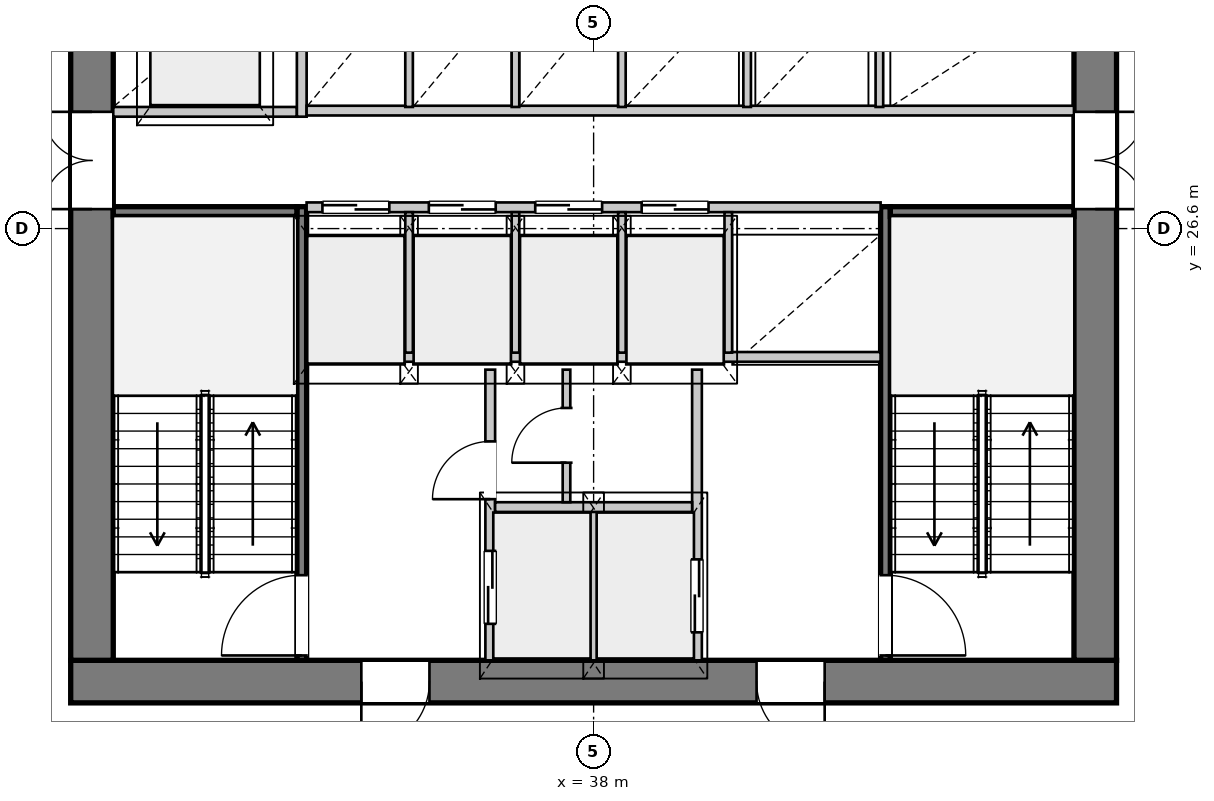
"""IFC4 building model, lengths in metres.
Left out: names, types, materials, properties, quantities, classifications, styles, units other than length and angle.
Written with IfcOpenShell. Run it as: python <this file> out.ifc"""

import sys

from ifc_helpers import new_model, si_unit, direction, frame, frame_2d, origin, place, context, subcontext, project, spatial, rectangle, extrude, source, transform, mapped, element, fill, save


model = new_model("IFC4")
c1 = context("Model", 3, precision=1e-05, world=origin(), true_north=direction((0.0, 1.0)))
c2 = subcontext(c1, "Body", "Model", "MODEL_VIEW")
j1 = project(units=[si_unit("LENGTHUNIT", "METRE"), si_unit("PLANEANGLEUNIT", "RADIAN")], contexts=[c1])
p1 = place(None, origin())
s1 = spatial("IfcSite", under=j1, at=p1, CompositionType="ELEMENT")
p2 = place(p1, origin())
s2 = spatial("IfcBuilding", under=s1, at=p2, CompositionType="ELEMENT")
p3 = place(p2, frame((0.0, 0.0, 105.7)))
s3 = spatial("IfcBuildingStorey", under=s2, at=p3, CompositionType="ELEMENT", Elevation=105.7)
p4 = place(p3, frame((46.6, 19.15, 0.0), z_axis=(0.0, 0.0, 1.0), x_axis=(-1.0, 0.0, 0.0)))
e1 = element("IfcWall", 1, at=p4, inside=s3, PredefinedType="SHEAR", context=c2, shape_type="SweptSolid", body=[
    extrude(rectangle(XDim=17.2, YDim=0.7, at=frame_2d((8.6, 0.0))), origin(), (0.0, 0.0, 1.0), 3.3),
])
p5 = place(p4, frame((4.8, 0.0, 0.0)))
e2 = element("IfcOpeningElement", 2, at=p5, cuts=e1, PredefinedType="OPENING", context=c2, shape_type="SweptSolid", body=[
    extrude(rectangle(XDim=1.12, YDim=2.25, at=frame_2d((0.56, 1.125))), frame((0.0, 0.36, 0.0), z_axis=(0.0, -1.0, 0.0), x_axis=(1.0, 0.0, 0.0)), (0.0, 0.0, 1.0), 0.72),
])
p6 = place(p4, frame((11.3, 0.0, 0.0)))
e3 = element("IfcOpeningElement", 3, at=p6, cuts=e1, PredefinedType="OPENING", context=c2, shape_type="SweptSolid", body=[
    extrude(rectangle(XDim=1.12, YDim=2.25, at=frame_2d((0.56, 1.125))), frame((0.0, 0.36, 0.0), z_axis=(0.0, -1.0, 0.0), x_axis=(1.0, 0.0, 0.0)), (0.0, 0.0, 1.0), 0.72),
])
p7 = place(p3, frame((29.75, 19.5, 0.0), z_axis=(0.0, 0.0, 1.0), x_axis=(0.0, 1.0, 0.0)))
e4 = element("IfcWall", 4, at=p7, inside=s3, PredefinedType="SHEAR", context=c2, shape_type="SweptSolid", body=[
    extrude(rectangle(XDim=14.2, YDim=0.7, at=frame_2d((7.1, 0.0))), origin(), (0.0, 0.0, 1.0), 3.3),
])
p8 = place(p7, frame((7.42, 0.0, 0.0)))
e5 = element("IfcOpeningElement", 5, at=p8, cuts=e4, PredefinedType="OPENING", context=c2, shape_type="SweptSolid", body=[
    extrude(rectangle(XDim=1.6, YDim=2.2, at=frame_2d((0.8, 1.1))), frame((0.0, 0.36, 0.0), z_axis=(0.0, -1.0, 0.0), x_axis=(1.0, 0.0, 0.0)), (0.0, 0.0, 1.0), 0.72),
])
p9 = place(p3, frame((46.25, 33.7, 0.0), z_axis=(0.0, 0.0, 1.0), x_axis=(0.0, -1.0, 0.0)))
e6 = element("IfcWall", 6, at=p9, inside=s3, PredefinedType="SHEAR", context=c2, shape_type="SweptSolid", body=[
    extrude(rectangle(XDim=14.2, YDim=0.7, at=frame_2d((7.1, 0.0))), origin(), (0.0, 0.0, 1.0), 3.3),
])
p10 = place(p9, frame((5.18, 0.0, 0.0)))
e7 = element("IfcOpeningElement", 7, at=p10, cuts=e6, PredefinedType="OPENING", context=c2, shape_type="SweptSolid", body=[
    extrude(rectangle(XDim=1.6, YDim=2.2, at=frame_2d((0.8, 1.1))), frame((0.0, 0.36, 0.0), z_axis=(0.0, -1.0, 0.0), x_axis=(1.0, 0.0, 0.0)), (0.0, 0.0, 1.0), 0.72),
])
p11 = place(p3, frame((33.2, 19.5, 0.0), z_axis=(0.0, 0.0, 1.0), x_axis=(0.0, 1.0, 0.0)))
e8 = element("IfcWall", 8, at=p11, inside=s3, PredefinedType="PARTITIONING", context=c2, shape_type="SweptSolid", body=[
    extrude(rectangle(XDim=7.46, YDim=0.16, at=frame_2d((3.73, 0.0))), origin(), (0.0, 0.0, 1.0), 3.3),
])
p12 = place(p11, frame((0.08, 0.0, 0.0)))
e9 = element("IfcOpeningElement", 9, at=p12, cuts=e8, PredefinedType="OPENING", context=c2, shape_type="SweptSolid", body=[
    extrude(rectangle(XDim=1.32, YDim=2.2, at=frame_2d((0.66, 1.1))), frame((0.0, 0.09, 0.0), z_axis=(0.0, -1.0, 0.0), x_axis=(1.0, 0.0, 0.0)), (0.0, 0.0, 1.0), 0.18),
])
p13 = place(p3, frame((30.1, 26.88, 0.0), z_axis=(0.0, 0.0, 1.0), x_axis=(1.0, 0.0, 0.0)))
e10 = element("IfcWall", 10, at=p13, inside=s3, PredefinedType="PARTITIONING", context=c2, shape_type="SweptSolid", body=[
    extrude(rectangle(XDim=3.02, YDim=0.16, at=frame_2d((1.51, 0.0))), origin(), (0.0, 0.0, 1.0), 3.3),
])
p14 = place(p3, frame((42.8, 26.96, 0.0), z_axis=(0.0, 0.0, 1.0), x_axis=(0.0, -1.0, 0.0)))
e11 = element("IfcWall", 11, at=p14, inside=s3, PredefinedType="PARTITIONING", context=c2, shape_type="SweptSolid", body=[
    extrude(rectangle(XDim=7.46, YDim=0.16, at=frame_2d((3.73, 0.0))), origin(), (0.0, 0.0, 1.0), 3.3),
])
p15 = place(p14, frame((6.06, 0.0, 0.0)))
e12 = element("IfcOpeningElement", 12, at=p15, cuts=e11, PredefinedType="OPENING", context=c2, shape_type="SweptSolid", body=[
    extrude(rectangle(XDim=1.32, YDim=2.2, at=frame_2d((0.66, 1.1))), frame((0.0, 0.09, 0.0), z_axis=(0.0, -1.0, 0.0), x_axis=(1.0, 0.0, 0.0)), (0.0, 0.0, 1.0), 0.18),
])
p16 = place(p3, frame((42.88, 26.88, 0.0), z_axis=(0.0, 0.0, 1.0), x_axis=(1.0, 0.0, 0.0)))
e13 = element("IfcWall", 13, at=p16, inside=s3, PredefinedType="PARTITIONING", context=c2, shape_type="SweptSolid", body=[
    extrude(rectangle(XDim=3.02, YDim=0.16, at=frame_2d((1.51, 0.0))), origin(), (0.0, 0.0, 1.0), 3.3),
])
p17 = place(p3, frame((36.3, 19.5, 0.0), z_axis=(0.0, 0.0, 1.0), x_axis=(0.0, 1.0, 0.0)))
e14 = element("IfcWall", 14, at=p17, inside=s3, PredefinedType="PARTITIONING", context=c2, shape_type="SweptSolid", body=[
    extrude(rectangle(XDim=4.78, YDim=0.16, at=frame_2d((2.39, 0.0))), origin(), (0.0, 0.0, 1.0), 3.3),
])
p18 = place(p17, frame((0.6, 0.0, 0.0)))
e15 = element("IfcOpeningElement", 15, at=p18, cuts=e14, PredefinedType="OPENING", context=c2, shape_type="SweptSolid", body=[
    extrude(rectangle(XDim=1.2, YDim=2.2, at=frame_2d((0.6, 1.1))), frame((0.0, 0.09, 0.0), z_axis=(0.0, -1.0, 0.0), x_axis=(1.0, 0.0, 0.0)), (0.0, 0.0, 1.0), 0.18),
])
p19 = place(p17, frame((2.65, 0.0, 0.0)))
e16 = element("IfcOpeningElement", 16, at=p19, cuts=e14, PredefinedType="OPENING", context=c2, shape_type="SweptSolid", body=[
    extrude(rectangle(XDim=0.95, YDim=2.1, at=frame_2d((0.475, 1.05))), frame((0.0, 0.09, 0.0), z_axis=(0.0, -1.0, 0.0), x_axis=(1.0, 0.0, 0.0)), (0.0, 0.0, 1.0), 0.18),
])
p20 = place(p3, frame((39.7, 24.28, 0.0), z_axis=(0.0, 0.0, 1.0), x_axis=(0.0, -1.0, 0.0)))
e17 = element("IfcWall", 17, at=p20, inside=s3, PredefinedType="PARTITIONING", context=c2, shape_type="SweptSolid", body=[
    extrude(rectangle(XDim=4.78, YDim=0.16, at=frame_2d((2.39, 0.0))), origin(), (0.0, 0.0, 1.0), 3.3),
])
p21 = place(p20, frame((3.12, 0.0, 0.0)))
e18 = element("IfcOpeningElement", 18, at=p21, cuts=e17, PredefinedType="OPENING", context=c2, shape_type="SweptSolid", body=[
    extrude(rectangle(XDim=1.2, YDim=2.2, at=frame_2d((0.6, 1.1))), frame((0.0, 0.09, 0.0), z_axis=(0.0, -1.0, 0.0), x_axis=(1.0, 0.0, 0.0)), (0.0, 0.0, 1.0), 0.18),
])
p22 = place(p3, frame((38.0, 19.5, 0.0), z_axis=(0.0, 0.0, 1.0), x_axis=(0.0, 1.0, 0.0)))
e19 = element("IfcWall", 19, at=p22, inside=s3, PredefinedType="PARTITIONING", context=c2, shape_type="SweptSolid", body=[
    extrude(rectangle(XDim=2.46, YDim=0.125, at=frame_2d((1.23, 0.0))), origin(), (0.0, 0.0, 1.0), 3.3),
])
p23 = place(p3, frame((36.38, 22.02, 0.0), z_axis=(0.0, 0.0, 1.0), x_axis=(1.0, 0.0, 0.0)))
e20 = element("IfcWall", 20, at=p23, inside=s3, PredefinedType="PARTITIONING", context=c2, shape_type="SweptSolid", body=[
    extrude(rectangle(XDim=3.24, YDim=0.16, at=frame_2d((1.62, 0.0))), origin(), (0.0, 0.0, 1.0), 3.3),
])
p24 = place(p3, frame((33.28, 24.49, 0.0), z_axis=(0.0, 0.0, 1.0), x_axis=(1.0, 0.0, 0.0)))
e21 = element("IfcWall", 21, at=p24, inside=s3, PredefinedType="PARTITIONING", context=c2, shape_type="SweptSolid", body=[
    extrude(rectangle(XDim=9.44, YDim=0.16, at=frame_2d((4.72, 0.0))), origin(), (0.0, 0.0, 1.0), 3.3),
])
p25 = place(p3, frame((37.554, 22.1, 0.0), z_axis=(0.0, 0.0, 1.0), x_axis=(0.0, 1.0, 0.0)))
e22 = element("IfcWall", 22, at=p25, inside=s3, PredefinedType="PARTITIONING", context=c2, shape_type="SweptSolid", body=[
    extrude(rectangle(XDim=2.18, YDim=0.125, at=frame_2d((1.09, 0.0))), origin(), (0.0, 0.0, 1.0), 3.3),
])
p26 = place(p25, frame((0.65, 0.0, 0.0)))
e23 = element("IfcOpeningElement", 23, at=p26, cuts=e22, PredefinedType="OPENING", context=c2, shape_type="SweptSolid", body=[
    extrude(rectangle(XDim=0.9, YDim=2.1, at=frame_2d((0.45, 1.05))), frame((0.0, 0.073, 0.0), z_axis=(0.0, -1.0, 0.0), x_axis=(1.0, 0.0, 0.0)), (0.0, 0.0, 1.0), 0.145),
])
p27 = place(p3, frame((30.1, 28.52, 0.0), z_axis=(0.0, 0.0, 1.0), x_axis=(1.0, 0.0, 0.0)))
e24 = element("IfcWall", 24, at=p27, inside=s3, PredefinedType="PARTITIONING", context=c2, shape_type="SweptSolid", body=[
    extrude(rectangle(XDim=3.02, YDim=0.16, at=frame_2d((1.51, 0.0))), origin(), (0.0, 0.0, 1.0), 3.3),
])
p28 = place(p3, frame((33.2, 28.44, 0.0), z_axis=(0.0, 0.0, 1.0), x_axis=(0.0, 1.0, 0.0)))
e25 = element("IfcWall", 25, at=p28, inside=s3, PredefinedType="PARTITIONING", context=c2, shape_type="SweptSolid", body=[
    extrude(rectangle(XDim=5.26, YDim=0.16, at=frame_2d((2.63, 0.0))), origin(), (0.0, 0.0, 1.0), 3.3),
])
p29 = place(p3, frame((33.28, 26.95, 0.0), z_axis=(0.0, 0.0, 1.0), x_axis=(1.0, 0.0, 0.0)))
e26 = element("IfcWall", 26, at=p29, inside=s3, PredefinedType="PARTITIONING", context=c2, shape_type="SweptSolid", body=[
    extrude(rectangle(XDim=9.44, YDim=0.16, at=frame_2d((4.72, 0.0))), origin(), (0.0, 0.0, 1.0), 3.3),
])
p30 = place(p29, frame((0.26, 0.0, 0.0)))
e27 = element("IfcOpeningElement", 27, at=p30, cuts=e26, PredefinedType="OPENING", context=c2, shape_type="SweptSolid", body=[
    extrude(rectangle(XDim=1.1, YDim=2.2, at=frame_2d((0.55, 1.1))), frame((0.0, 0.09, 0.0), z_axis=(0.0, -1.0, 0.0), x_axis=(1.0, 0.0, 0.0)), (0.0, 0.0, 1.0), 0.18),
])
p31 = place(p29, frame((2.01, 0.0, 0.0)))
e28 = element("IfcOpeningElement", 28, at=p31, cuts=e26, PredefinedType="OPENING", context=c2, shape_type="SweptSolid", body=[
    extrude(rectangle(XDim=1.1, YDim=2.2, at=frame_2d((0.55, 1.1))), frame((0.0, 0.09, 0.0), z_axis=(0.0, -1.0, 0.0), x_axis=(1.0, 0.0, 0.0)), (0.0, 0.0, 1.0), 0.18),
])
p32 = place(p29, frame((3.76, 0.0, 0.0)))
e29 = element("IfcOpeningElement", 29, at=p32, cuts=e26, PredefinedType="OPENING", context=c2, shape_type="SweptSolid", body=[
    extrude(rectangle(XDim=1.1, YDim=2.2, at=frame_2d((0.55, 1.1))), frame((0.0, 0.09, 0.0), z_axis=(0.0, -1.0, 0.0), x_axis=(1.0, 0.0, 0.0)), (0.0, 0.0, 1.0), 0.18),
])
p33 = place(p29, frame((5.51, 0.0, 0.0)))
e30 = element("IfcOpeningElement", 30, at=p33, cuts=e26, PredefinedType="OPENING", context=c2, shape_type="SweptSolid", body=[
    extrude(rectangle(XDim=1.1, YDim=2.2, at=frame_2d((0.55, 1.1))), frame((0.0, 0.09, 0.0), z_axis=(0.0, -1.0, 0.0), x_axis=(1.0, 0.0, 0.0)), (0.0, 0.0, 1.0), 0.18),
])
for number, where, z_axis, x_axis in (
    (31, (34.965, 24.56, 0.0), (0.0, 0.0, 1.0), (0.0, 1.0, 0.0)),
    (32, (36.715, 24.56, 0.0), (0.0, 0.0, 1.0), (0.0, 1.0, 0.0)),
    (33, (38.465, 24.56, 0.0), (0.0, 0.0, 1.0), (0.0, 1.0, 0.0)),
    (34, (40.215, 24.56, 0.0), (0.0, 0.0, 1.0), (0.0, 1.0, 0.0)),
):
    element("IfcWall", number, at=place(p3, frame(where, z_axis=z_axis, x_axis=x_axis)), inside=s3, PredefinedType="PARTITIONING", context=c2, shape_type="SweptSolid", body=[
        extrude(rectangle(XDim=2.31, YDim=0.125, at=frame_2d((1.155, 0.0))), origin(), (0.0, 0.0, 1.0), 3.3),
    ])
p34 = place(p3, frame((33.28, 28.54, 0.0), z_axis=(0.0, 0.0, 1.0), x_axis=(1.0, 0.0, 0.0)))
e35 = element("IfcWall", 35, at=p34, inside=s3, PredefinedType="PARTITIONING", context=c2, shape_type="SweptSolid", body=[
    extrude(rectangle(XDim=12.62, YDim=0.16, at=frame_2d((6.31, 0.0))), origin(), (0.0, 0.0, 1.0), 3.3),
])
for number, where, z_axis, x_axis in (
    (36, (34.965, 28.6, 0.0), (0.0, 0.0, 1.0), (0.0, 1.0, 0.0)),
    (37, (36.715, 28.6, 0.0), (0.0, 0.0, 1.0), (0.0, 1.0, 0.0)),
    (38, (38.465, 28.6, 0.0), (0.0, 0.0, 1.0), (0.0, 1.0, 0.0)),
    (39, (40.525, 28.6, 0.0), (0.0, 0.0, 1.0), (0.0, 1.0, 0.0)),
    (40, (42.7, 28.6, 0.0), (0.0, 0.0, 1.0), (0.0, 1.0, 0.0)),
):
    element("IfcWall", number, at=place(p3, frame(where, z_axis=z_axis, x_axis=x_axis)), inside=s3, PredefinedType="PARTITIONING", context=c2, shape_type="SweptSolid", body=[
        extrude(rectangle(XDim=1.92, YDim=0.125, at=frame_2d((0.96, 0.0))), origin(), (0.0, 0.0, 1.0), 3.3),
    ])
m1 = source(origin(), c2, "Body", "SweptSolid", [
    extrude(rectangle(XDim=1.12, YDim=2.25, at=frame_2d((0.56, 1.125))), frame((0.0, 0.025, 0.0), z_axis=(0.0, -1.0, 0.0), x_axis=(1.0, 0.0, 0.0)), (0.0, 0.0, 1.0), 0.05),
])
p35 = place(p5, origin())
e41 = element("IfcDoor", 41, at=p35, inside=s3, OperationType="SINGLE_SWING_LEFT", PredefinedType="DOOR", context=c2, shape_type="MappedRepresentation", body=[
    mapped(m1, transform((0.0, 0.0, 0.0), x_axis=(1.0, 0.0, 0.0), y_axis=(0.0, 1.0, 0.0), z_axis=(0.0, 0.0, 1.0), scale=1.0)),
])
fill(e2, e41)
p36 = place(p6, origin())
e42 = element("IfcDoor", 42, at=p36, inside=s3, OperationType="SINGLE_SWING_RIGHT", PredefinedType="DOOR", context=c2, shape_type="MappedRepresentation", body=[
    mapped(m1, transform((0.0, 0.0, 0.0), x_axis=(1.0, 0.0, 0.0), y_axis=(0.0, 1.0, 0.0), z_axis=(0.0, 0.0, 1.0), scale=1.0)),
])
fill(e3, e42)
m2 = source(origin(), c2, "Body", "SweptSolid", [
    extrude(rectangle(XDim=1.6, YDim=2.2, at=frame_2d((0.8, 1.1))), frame((0.0, 0.025, 0.0), z_axis=(0.0, -1.0, 0.0), x_axis=(1.0, 0.0, 0.0)), (0.0, 0.0, 1.0), 0.05),
])
p37 = place(p8, origin())
e43 = element("IfcDoor", 43, at=p37, inside=s3, OperationType="DOUBLE_DOOR_SINGLE_SWING", PredefinedType="DOOR", context=c2, shape_type="MappedRepresentation", body=[
    mapped(m2, transform((0.0, 0.0, 0.0), x_axis=(1.0, 0.0, 0.0), y_axis=(0.0, 1.0, 0.0), z_axis=(0.0, 0.0, 1.0), scale=1.0)),
])
fill(e5, e43)
p38 = place(p10, origin())
e44 = element("IfcDoor", 44, at=p38, inside=s3, OperationType="DOUBLE_DOOR_SINGLE_SWING", PredefinedType="DOOR", context=c2, shape_type="MappedRepresentation", body=[
    mapped(m2, transform((0.0, 0.0, 0.0), x_axis=(1.0, 0.0, 0.0), y_axis=(0.0, 1.0, 0.0), z_axis=(0.0, 0.0, 1.0), scale=1.0)),
])
fill(e7, e44)
m3 = source(origin(), c2, "Body", "SweptSolid", [
    extrude(rectangle(XDim=1.32, YDim=2.2, at=frame_2d((0.66, 1.1))), frame((0.0, 0.025, 0.0), z_axis=(0.0, -1.0, 0.0), x_axis=(1.0, 0.0, 0.0)), (0.0, 0.0, 1.0), 0.05),
])
p39 = place(p12, origin())
e45 = element("IfcDoor", 45, at=p39, inside=s3, OperationType="SINGLE_SWING_LEFT", PredefinedType="DOOR", context=c2, shape_type="MappedRepresentation", body=[
    mapped(m3, transform((0.0, 0.0, 0.0), x_axis=(1.0, 0.0, 0.0), y_axis=(0.0, 1.0, 0.0), z_axis=(0.0, 0.0, 1.0), scale=1.0)),
])
fill(e9, e45)
p40 = place(p15, origin())
e46 = element("IfcDoor", 46, at=p40, inside=s3, OperationType="SINGLE_SWING_RIGHT", PredefinedType="DOOR", context=c2, shape_type="MappedRepresentation", body=[
    mapped(m3, transform((0.0, 0.0, 0.0), x_axis=(1.0, 0.0, 0.0), y_axis=(0.0, 1.0, 0.0), z_axis=(0.0, 0.0, 1.0), scale=1.0)),
])
fill(e12, e46)
m4 = source(origin(), c2, "Body", "SweptSolid", [
    extrude(rectangle(XDim=1.2, YDim=2.2, at=frame_2d((0.6, 1.1))), frame((0.0, 0.025, 0.0), z_axis=(0.0, -1.0, 0.0), x_axis=(1.0, 0.0, 0.0)), (0.0, 0.0, 1.0), 0.05),
])
p41 = place(p18, origin())
e47 = element("IfcDoor", 47, at=p41, inside=s3, OperationType="DOUBLE_DOOR_SLIDING", PredefinedType="DOOR", context=c2, shape_type="MappedRepresentation", body=[
    mapped(m4, transform((0.0, 0.0, 0.0), x_axis=(1.0, 0.0, 0.0), y_axis=(0.0, 1.0, 0.0), z_axis=(0.0, 0.0, 1.0), scale=1.0)),
])
fill(e15, e47)
m5 = source(origin(), c2, "Body", "SweptSolid", [
    extrude(rectangle(XDim=0.95, YDim=2.1, at=frame_2d((0.475, 1.05))), frame((0.0, 0.025, 0.0), z_axis=(0.0, -1.0, 0.0), x_axis=(1.0, 0.0, 0.0)), (0.0, 0.0, 1.0), 0.05),
])
p42 = place(p19, origin())
e48 = element("IfcDoor", 48, at=p42, inside=s3, OperationType="SINGLE_SWING_LEFT", PredefinedType="DOOR", context=c2, shape_type="MappedRepresentation", body=[
    mapped(m5, transform((0.0, 0.0, 0.0), x_axis=(1.0, 0.0, 0.0), y_axis=(0.0, 1.0, 0.0), z_axis=(0.0, 0.0, 1.0), scale=1.0)),
])
fill(e16, e48)
m6 = source(origin(), c2, "Body", "SweptSolid", [
    extrude(rectangle(XDim=0.9, YDim=2.1, at=frame_2d((0.45, 1.05))), frame((0.0, 0.025, 0.0), z_axis=(0.0, -1.0, 0.0), x_axis=(1.0, 0.0, 0.0)), (0.0, 0.0, 1.0), 0.05),
])
p43 = place(p26, origin())
e49 = element("IfcDoor", 49, at=p43, inside=s3, OperationType="SINGLE_SWING_LEFT", PredefinedType="DOOR", context=c2, shape_type="MappedRepresentation", body=[
    mapped(m6, transform((0.0, 0.0, 0.0), x_axis=(1.0, 0.0, 0.0), y_axis=(0.0, 1.0, 0.0), z_axis=(0.0, 0.0, 1.0), scale=1.0)),
])
fill(e23, e49)
p44 = place(p21, origin())
e50 = element("IfcDoor", 50, at=p44, inside=s3, OperationType="DOUBLE_DOOR_SLIDING", PredefinedType="DOOR", context=c2, shape_type="MappedRepresentation", body=[
    mapped(m4, transform((0.0, 0.0, 0.0), x_axis=(1.0, 0.0, 0.0), y_axis=(0.0, 1.0, 0.0), z_axis=(0.0, 0.0, 1.0), scale=1.0)),
])
fill(e18, e50)
m7 = source(origin(), c2, "Body", "SweptSolid", [
    extrude(rectangle(XDim=1.1, YDim=2.2, at=frame_2d((0.55, 1.1))), frame((0.0, 0.025, 0.0), z_axis=(0.0, -1.0, 0.0), x_axis=(1.0, 0.0, 0.0)), (0.0, 0.0, 1.0), 0.05),
])
p45 = place(p30, origin())
e51 = element("IfcDoor", 51, at=p45, inside=s3, OperationType="DOUBLE_DOOR_SLIDING", PredefinedType="DOOR", context=c2, shape_type="MappedRepresentation", body=[
    mapped(m7, transform((0.0, 0.0, 0.0), x_axis=(1.0, 0.0, 0.0), y_axis=(0.0, 1.0, 0.0), z_axis=(0.0, 0.0, 1.0), scale=1.0)),
])
fill(e27, e51)
p46 = place(p31, origin())
e52 = element("IfcDoor", 52, at=p46, inside=s3, OperationType="DOUBLE_DOOR_SLIDING", PredefinedType="DOOR", context=c2, shape_type="MappedRepresentation", body=[
    mapped(m7, transform((0.0, 0.0, 0.0), x_axis=(1.0, 0.0, 0.0), y_axis=(0.0, 1.0, 0.0), z_axis=(0.0, 0.0, 1.0), scale=1.0)),
])
fill(e28, e52)
p47 = place(p32, origin())
e53 = element("IfcDoor", 53, at=p47, inside=s3, OperationType="DOUBLE_DOOR_SLIDING", PredefinedType="DOOR", context=c2, shape_type="MappedRepresentation", body=[
    mapped(m7, transform((0.0, 0.0, 0.0), x_axis=(1.0, 0.0, 0.0), y_axis=(0.0, 1.0, 0.0), z_axis=(0.0, 0.0, 1.0), scale=1.0)),
])
fill(e29, e53)
p48 = place(p33, origin())
e54 = element("IfcDoor", 54, at=p48, inside=s3, OperationType="DOUBLE_DOOR_SLIDING", PredefinedType="DOOR", context=c2, shape_type="MappedRepresentation", body=[
    mapped(m7, transform((0.0, 0.0, 0.0), x_axis=(1.0, 0.0, 0.0), y_axis=(0.0, 1.0, 0.0), z_axis=(0.0, 0.0, 1.0), scale=1.0)),
])
fill(e30, e54)
save(model, sys.argv[1])
